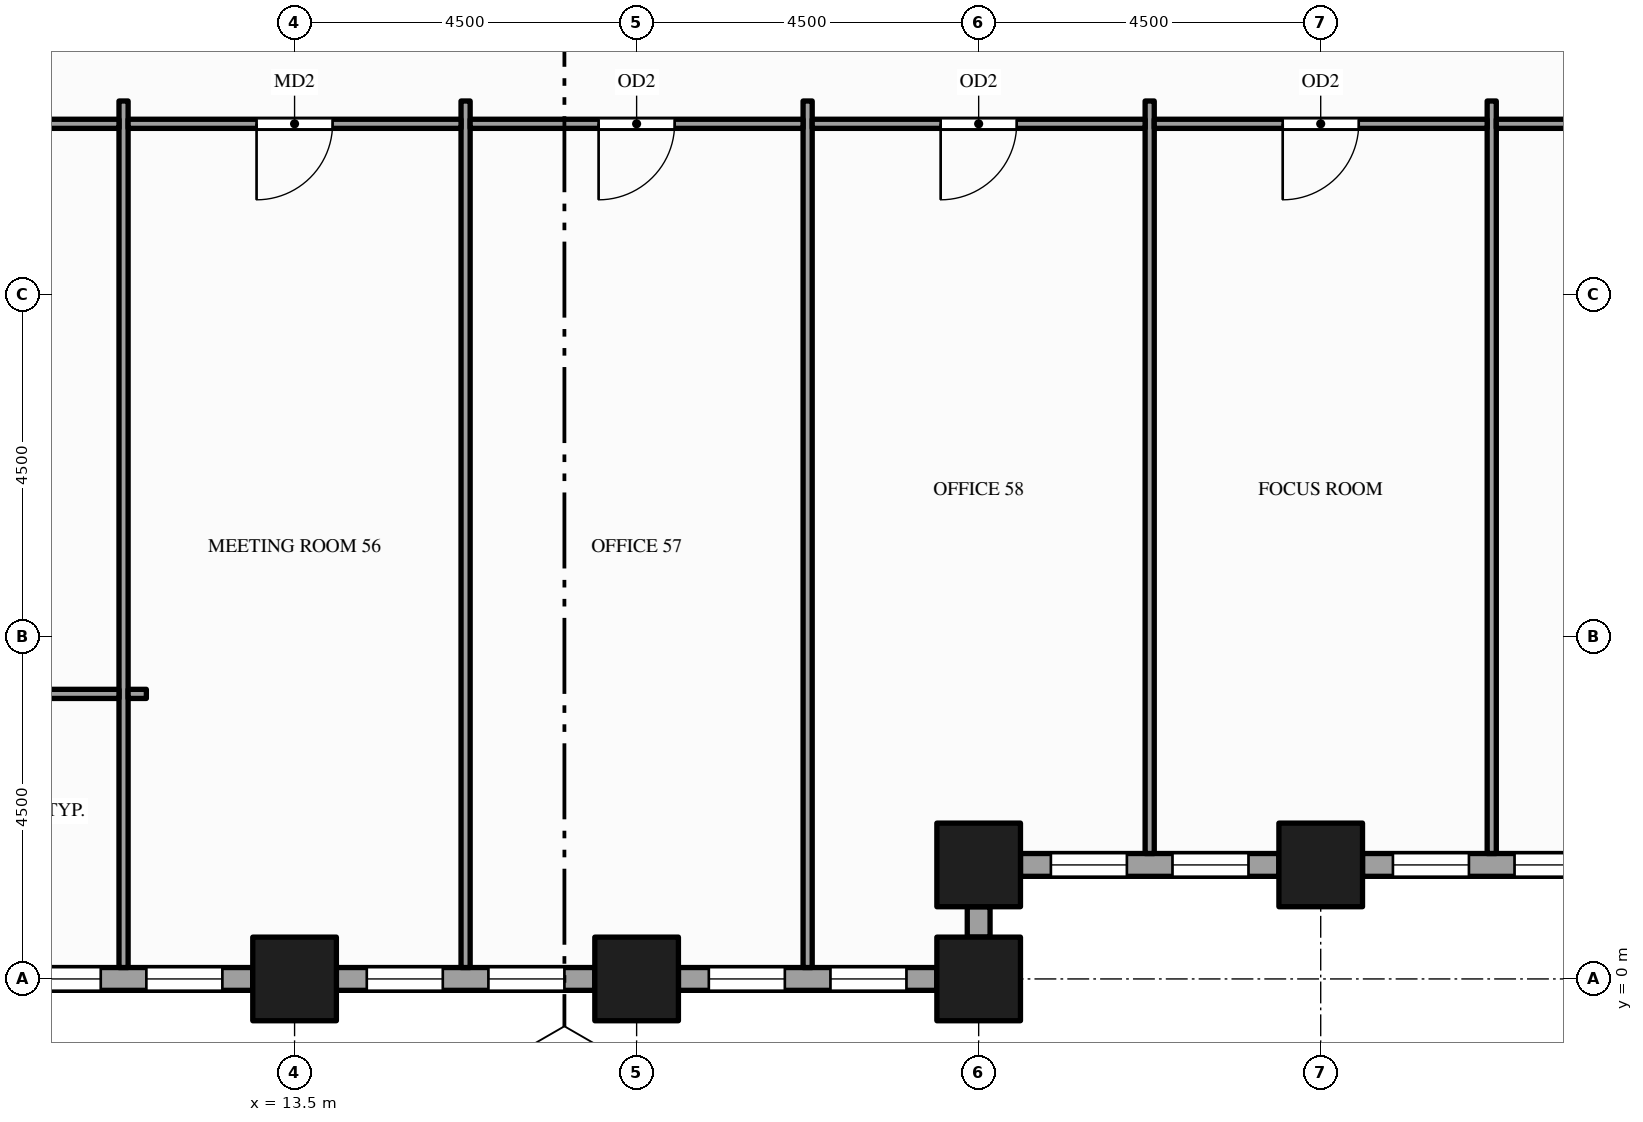
"""IFC4 building model, lengths in metres.
Left out: names, types, materials, properties, quantities, classifications, styles, units other than length and angle.
Written with IfcOpenShell. Run it as: python <this file> out.ifc"""

import sys

from ifc_helpers import new_model, si_unit, direction, frame, frame_2d, origin, origin_2d, place, context, subcontext, project, spatial, rectangle, hollow_rectangle, extrude, element, fill, save


model = new_model("IFC4")
c1 = context("Model", 3, precision=1e-05, world=origin(), true_north=direction((0.0, 1.0)))
c2 = subcontext(c1, "Body", "Model", "MODEL_VIEW")
j1 = project(units=[si_unit("LENGTHUNIT", "METRE"), si_unit("PLANEANGLEUNIT", "RADIAN")], contexts=[c1])
p1 = place(None, origin())
s1 = spatial("IfcSite", under=j1, at=p1, CompositionType="ELEMENT")
p2 = place(p1, origin())
s2 = spatial("IfcBuilding", under=s1, at=p2, CompositionType="ELEMENT")
p3 = place(p2, frame((0.0, 0.0, 45.0)))
s3 = spatial("IfcBuildingStorey", under=s2, at=p3, CompositionType="ELEMENT", Elevation=45.0)
for number, where, z_axis, x_axis in (
    (1, (13.5, 0.0, -0.15), (0.0, 0.0, 1.0), (1.0, 0.0, 0.0)),
    (2, (18.0, 0.0, -0.15), (0.0, 0.0, 1.0), (1.0, 0.0, 0.0)),
    (3, (22.5, 0.0, -0.15), (0.0, 0.0, 1.0), (1.0, 0.0, 0.0)),
    (4, (22.5, 1.5, -0.15), (0.0, 0.0, 1.0), (1.0, 0.0, 0.0)),
    (5, (27.0, 1.5, -0.15), (0.0, 0.0, 1.0), (1.0, 0.0, 0.0)),
):
    element("IfcColumn", number, at=place(p3, frame(where, z_axis=z_axis, x_axis=x_axis)), inside=s3, PredefinedType="COLUMN", context=c2, shape_type="SweptSolid", body=[
        extrude(hollow_rectangle(XDim=1.1, YDim=1.1, WallThickness=0.06, at=origin_2d()), origin(), (0.0, 0.0, 1.0), 4.0),
    ])
p4 = place(p3, frame((9.55, 0.0, 0.0), z_axis=(0.0, 0.0, 1.0), x_axis=(1.0, 0.0, 0.0)))
e6 = element("IfcWall", 6, at=p4, inside=s3, PredefinedType="STANDARD", context=c2, shape_type="SweptSolid", body=[
    extrude(rectangle(XDim=3.4, YDim=0.3, at=frame_2d((1.7, 0.0))), origin(), (0.0, 0.0, 1.0), 3.144),
])
p5 = place(p4, frame((0.4, 0.0, 0.9)))
e7 = element("IfcOpeningElement", 7, at=p5, cuts=e6, PredefinedType="OPENING", context=c2, shape_type="SweptSolid", body=[
    extrude(rectangle(XDim=1.0, YDim=2.0, at=frame_2d((0.5, 1.0))), frame((0.0, 0.16, 0.0), z_axis=(0.0, -1.0, 0.0), x_axis=(1.0, 0.0, 0.0)), (0.0, 0.0, 1.0), 0.32),
])
p6 = place(p4, frame((2.0, 0.0, 0.9)))
e8 = element("IfcOpeningElement", 8, at=p6, cuts=e6, PredefinedType="OPENING", context=c2, shape_type="SweptSolid", body=[
    extrude(rectangle(XDim=1.0, YDim=2.0, at=frame_2d((0.5, 1.0))), frame((0.0, 0.16, 0.0), z_axis=(0.0, -1.0, 0.0), x_axis=(1.0, 0.0, 0.0)), (0.0, 0.0, 1.0), 0.32),
])
p7 = place(p3, frame((14.05, 0.0, 0.0), z_axis=(0.0, 0.0, 1.0), x_axis=(1.0, 0.0, 0.0)))
e9 = element("IfcWall", 9, at=p7, inside=s3, PredefinedType="STANDARD", context=c2, shape_type="SweptSolid", body=[
    extrude(rectangle(XDim=3.4, YDim=0.3, at=frame_2d((1.7, 0.0))), origin(), (0.0, 0.0, 1.0), 3.144),
])
p8 = place(p7, frame((0.4, 0.0, 0.9)))
e10 = element("IfcOpeningElement", 10, at=p8, cuts=e9, PredefinedType="OPENING", context=c2, shape_type="SweptSolid", body=[
    extrude(rectangle(XDim=1.0, YDim=2.0, at=frame_2d((0.5, 1.0))), frame((0.0, 0.16, 0.0), z_axis=(0.0, -1.0, 0.0), x_axis=(1.0, 0.0, 0.0)), (0.0, 0.0, 1.0), 0.32),
])
p9 = place(p7, frame((2.0, 0.0, 0.9)))
e11 = element("IfcOpeningElement", 11, at=p9, cuts=e9, PredefinedType="OPENING", context=c2, shape_type="SweptSolid", body=[
    extrude(rectangle(XDim=1.0, YDim=2.0, at=frame_2d((0.5, 1.0))), frame((0.0, 0.16, 0.0), z_axis=(0.0, -1.0, 0.0), x_axis=(1.0, 0.0, 0.0)), (0.0, 0.0, 1.0), 0.32),
])
p10 = place(p3, frame((18.55, 0.0, 0.0), z_axis=(0.0, 0.0, 1.0), x_axis=(1.0, 0.0, 0.0)))
e12 = element("IfcWall", 12, at=p10, inside=s3, PredefinedType="STANDARD", context=c2, shape_type="SweptSolid", body=[
    extrude(rectangle(XDim=3.4, YDim=0.3, at=frame_2d((1.7, 0.0))), origin(), (0.0, 0.0, 1.0), 3.144),
])
p11 = place(p10, frame((0.4, 0.0, 0.9)))
e13 = element("IfcOpeningElement", 13, at=p11, cuts=e12, PredefinedType="OPENING", context=c2, shape_type="SweptSolid", body=[
    extrude(rectangle(XDim=1.0, YDim=2.0, at=frame_2d((0.5, 1.0))), frame((0.0, 0.16, 0.0), z_axis=(0.0, -1.0, 0.0), x_axis=(1.0, 0.0, 0.0)), (0.0, 0.0, 1.0), 0.32),
])
p12 = place(p10, frame((2.0, 0.0, 0.9)))
e14 = element("IfcOpeningElement", 14, at=p12, cuts=e12, PredefinedType="OPENING", context=c2, shape_type="SweptSolid", body=[
    extrude(rectangle(XDim=1.0, YDim=2.0, at=frame_2d((0.5, 1.0))), frame((0.0, 0.16, 0.0), z_axis=(0.0, -1.0, 0.0), x_axis=(1.0, 0.0, 0.0)), (0.0, 0.0, 1.0), 0.32),
])
p13 = place(p3, frame((22.5, 0.55, 0.0), z_axis=(0.0, 0.0, 1.0), x_axis=(0.0, 1.0, 0.0)))
e15 = element("IfcWall", 15, at=p13, inside=s3, PredefinedType="STANDARD", context=c2, shape_type="SweptSolid", body=[
    extrude(rectangle(XDim=0.4, YDim=0.3, at=frame_2d((0.2, 0.0))), origin(), (0.0, 0.0, 1.0), 3.144),
])
p14 = place(p3, frame((23.05, 1.5, 0.0), z_axis=(0.0, 0.0, 1.0), x_axis=(1.0, 0.0, 0.0)))
e16 = element("IfcWall", 16, at=p14, inside=s3, PredefinedType="STANDARD", context=c2, shape_type="SweptSolid", body=[
    extrude(rectangle(XDim=3.4, YDim=0.3, at=frame_2d((1.7, 0.0))), origin(), (0.0, 0.0, 1.0), 3.144),
])
p15 = place(p14, frame((0.4, 0.0, 0.9)))
e17 = element("IfcOpeningElement", 17, at=p15, cuts=e16, PredefinedType="OPENING", context=c2, shape_type="SweptSolid", body=[
    extrude(rectangle(XDim=1.0, YDim=2.0, at=frame_2d((0.5, 1.0))), frame((0.0, 0.16, 0.0), z_axis=(0.0, -1.0, 0.0), x_axis=(1.0, 0.0, 0.0)), (0.0, 0.0, 1.0), 0.32),
])
p16 = place(p14, frame((2.0, 0.0, 0.9)))
e18 = element("IfcOpeningElement", 18, at=p16, cuts=e16, PredefinedType="OPENING", context=c2, shape_type="SweptSolid", body=[
    extrude(rectangle(XDim=1.0, YDim=2.0, at=frame_2d((0.5, 1.0))), frame((0.0, 0.16, 0.0), z_axis=(0.0, -1.0, 0.0), x_axis=(1.0, 0.0, 0.0)), (0.0, 0.0, 1.0), 0.32),
])
p17 = place(p3, frame((27.55, 1.5, 0.0), z_axis=(0.0, 0.0, 1.0), x_axis=(1.0, 0.0, 0.0)))
e19 = element("IfcWall", 19, at=p17, inside=s3, PredefinedType="STANDARD", context=c2, shape_type="SweptSolid", body=[
    extrude(rectangle(XDim=3.4, YDim=0.3, at=frame_2d((1.7, 0.0))), origin(), (0.0, 0.0, 1.0), 3.144),
])
p18 = place(p17, frame((0.4, 0.0, 0.9)))
e20 = element("IfcOpeningElement", 20, at=p18, cuts=e19, PredefinedType="OPENING", context=c2, shape_type="SweptSolid", body=[
    extrude(rectangle(XDim=1.0, YDim=2.0, at=frame_2d((0.5, 1.0))), frame((0.0, 0.16, 0.0), z_axis=(0.0, -1.0, 0.0), x_axis=(1.0, 0.0, 0.0)), (0.0, 0.0, 1.0), 0.32),
])
p19 = place(p17, frame((2.0, 0.0, 0.9)))
e21 = element("IfcOpeningElement", 21, at=p19, cuts=e19, PredefinedType="OPENING", context=c2, shape_type="SweptSolid", body=[
    extrude(rectangle(XDim=1.0, YDim=2.0, at=frame_2d((0.5, 1.0))), frame((0.0, 0.16, 0.0), z_axis=(0.0, -1.0, 0.0), x_axis=(1.0, 0.0, 0.0)), (0.0, 0.0, 1.0), 0.32),
])
for number, where, z_axis, x_axis in (
    (22, (11.25, 0.15, 0.0), (0.0, 0.0, 1.0), (0.0, 1.0, 0.0)),
    (23, (15.75, 0.15, 0.0), (0.0, 0.0, 1.0), (0.0, 1.0, 0.0)),
    (24, (20.25, 0.15, 0.0), (0.0, 0.0, 1.0), (0.0, 1.0, 0.0)),
):
    element("IfcWall", number, at=place(p3, frame(where, z_axis=z_axis, x_axis=x_axis)), inside=s3, PredefinedType="PARTITIONING", context=c2, shape_type="SweptSolid", body=[
        extrude(rectangle(XDim=11.4, YDim=0.12, at=frame_2d((5.7, 0.0))), origin(), (0.0, 0.0, 1.0), 2.938),
    ])
for number, where, z_axis, x_axis in (
    (25, (24.75, 1.65, 0.0), (0.0, 0.0, 1.0), (0.0, 1.0, 0.0)),
    (26, (29.25, 1.65, 0.0), (0.0, 0.0, 1.0), (0.0, 1.0, 0.0)),
):
    element("IfcWall", number, at=place(p3, frame(where, z_axis=z_axis, x_axis=x_axis)), inside=s3, PredefinedType="PARTITIONING", context=c2, shape_type="SweptSolid", body=[
        extrude(rectangle(XDim=9.9, YDim=0.12, at=frame_2d((4.95, 0.0))), origin(), (0.0, 0.0, 1.0), 2.938),
    ])
p20 = place(p3, frame((9.125, 3.75, 0.0), z_axis=(0.0, 0.0, 1.0), x_axis=(1.0, 0.0, 0.0)))
e27 = element("IfcWall", 27, at=p20, inside=s3, PredefinedType="PARTITIONING", context=c2, shape_type="SweptSolid", body=[
    extrude(rectangle(XDim=2.065, YDim=0.12, at=frame_2d((1.032, 0.0))), origin(), (0.0, 0.0, 1.0), 2.938),
])
p21 = place(p3, frame((11.31, 3.75, 0.0), z_axis=(0.0, 0.0, 1.0), x_axis=(1.0, 0.0, 0.0)))
e28 = element("IfcWall", 28, at=p21, inside=s3, PredefinedType="PARTITIONING", context=c2, shape_type="SweptSolid", body=[
    extrude(rectangle(XDim=0.24, YDim=0.12, at=frame_2d((0.12, 0.0))), origin(), (0.0, 0.0, 1.0), 2.938),
])
p22 = place(p3, frame((0.15, 11.25, 0.0), z_axis=(0.0, 0.0, 1.0), x_axis=(1.0, 0.0, 0.0)))
e29 = element("IfcWall", 29, at=p22, inside=s3, PredefinedType="PARTITIONING", context=c2, shape_type="SweptSolid", body=[
    extrude(rectangle(XDim=11.04, YDim=0.12, at=frame_2d((5.52, 0.0))), origin(), (0.0, 0.0, 1.0), 2.938),
])
p23 = place(p22, frame((4.93, 0.0, 0.0)))
e30 = element("IfcOpeningElement", 30, at=p23, cuts=e29, PredefinedType="OPENING", context=c2, shape_type="SweptSolid", body=[
    extrude(rectangle(XDim=1.2, YDim=2.1, at=frame_2d((0.6, 1.05))), frame((0.0, 0.07, 0.0), z_axis=(0.0, -1.0, 0.0), x_axis=(1.0, 0.0, 0.0)), (0.0, 0.0, 1.0), 0.14),
])
p24 = place(p3, frame((11.31, 11.25, 0.0), z_axis=(0.0, 0.0, 1.0), x_axis=(1.0, 0.0, 0.0)))
e31 = element("IfcWall", 31, at=p24, inside=s3, PredefinedType="PARTITIONING", context=c2, shape_type="SweptSolid", body=[
    extrude(rectangle(XDim=4.38, YDim=0.12, at=frame_2d((2.19, 0.0))), origin(), (0.0, 0.0, 1.0), 2.938),
])
p25 = place(p24, frame((1.69, 0.0, 0.0)))
e32 = element("IfcOpeningElement", 32, at=p25, cuts=e31, PredefinedType="OPENING", context=c2, shape_type="SweptSolid", body=[
    extrude(rectangle(XDim=1.0, YDim=2.1, at=frame_2d((0.5, 1.05))), frame((0.0, 0.07, 0.0), z_axis=(0.0, -1.0, 0.0), x_axis=(1.0, 0.0, 0.0)), (0.0, 0.0, 1.0), 0.14),
])
p26 = place(p3, frame((15.81, 11.25, 0.0), z_axis=(0.0, 0.0, 1.0), x_axis=(1.0, 0.0, 0.0)))
e33 = element("IfcWall", 33, at=p26, inside=s3, PredefinedType="PARTITIONING", context=c2, shape_type="SweptSolid", body=[
    extrude(rectangle(XDim=4.38, YDim=0.12, at=frame_2d((2.19, 0.0))), origin(), (0.0, 0.0, 1.0), 2.938),
])
p27 = place(p26, frame((1.69, 0.0, 0.0)))
e34 = element("IfcOpeningElement", 34, at=p27, cuts=e33, PredefinedType="OPENING", context=c2, shape_type="SweptSolid", body=[
    extrude(rectangle(XDim=1.0, YDim=2.1, at=frame_2d((0.5, 1.05))), frame((0.0, 0.07, 0.0), z_axis=(0.0, -1.0, 0.0), x_axis=(1.0, 0.0, 0.0)), (0.0, 0.0, 1.0), 0.14),
])
p28 = place(p3, frame((20.31, 11.25, 0.0), z_axis=(0.0, 0.0, 1.0), x_axis=(1.0, 0.0, 0.0)))
e35 = element("IfcWall", 35, at=p28, inside=s3, PredefinedType="PARTITIONING", context=c2, shape_type="SweptSolid", body=[
    extrude(rectangle(XDim=4.38, YDim=0.12, at=frame_2d((2.19, 0.0))), origin(), (0.0, 0.0, 1.0), 2.938),
])
p29 = place(p28, frame((1.69, 0.0, 0.0)))
e36 = element("IfcOpeningElement", 36, at=p29, cuts=e35, PredefinedType="OPENING", context=c2, shape_type="SweptSolid", body=[
    extrude(rectangle(XDim=1.0, YDim=2.1, at=frame_2d((0.5, 1.05))), frame((0.0, 0.07, 0.0), z_axis=(0.0, -1.0, 0.0), x_axis=(1.0, 0.0, 0.0)), (0.0, 0.0, 1.0), 0.14),
])
p30 = place(p3, frame((24.81, 11.25, 0.0), z_axis=(0.0, 0.0, 1.0), x_axis=(1.0, 0.0, 0.0)))
e37 = element("IfcWall", 37, at=p30, inside=s3, PredefinedType="PARTITIONING", context=c2, shape_type="SweptSolid", body=[
    extrude(rectangle(XDim=4.38, YDim=0.12, at=frame_2d((2.19, 0.0))), origin(), (0.0, 0.0, 1.0), 2.938),
])
p31 = place(p30, frame((1.69, 0.0, 0.0)))
e38 = element("IfcOpeningElement", 38, at=p31, cuts=e37, PredefinedType="OPENING", context=c2, shape_type="SweptSolid", body=[
    extrude(rectangle(XDim=1.0, YDim=2.1, at=frame_2d((0.5, 1.05))), frame((0.0, 0.07, 0.0), z_axis=(0.0, -1.0, 0.0), x_axis=(1.0, 0.0, 0.0)), (0.0, 0.0, 1.0), 0.14),
])
p32 = place(p3, frame((29.31, 11.25, 0.0), z_axis=(0.0, 0.0, 1.0), x_axis=(1.0, 0.0, 0.0)))
e39 = element("IfcWall", 39, at=p32, inside=s3, PredefinedType="PARTITIONING", context=c2, shape_type="SweptSolid", body=[
    extrude(rectangle(XDim=8.88, YDim=0.12, at=frame_2d((4.44, 0.0))), origin(), (0.0, 0.0, 1.0), 2.938),
])
p33 = place(p32, frame((3.54, 0.0, 0.0)))
e40 = element("IfcOpeningElement", 40, at=p33, cuts=e39, PredefinedType="OPENING", context=c2, shape_type="SweptSolid", body=[
    extrude(rectangle(XDim=1.8, YDim=2.1, at=frame_2d((0.9, 1.05))), frame((0.0, 0.07, 0.0), z_axis=(0.0, -1.0, 0.0), x_axis=(1.0, 0.0, 0.0)), (0.0, 0.0, 1.0), 0.14),
])
p34 = place(p5, origin())
e41 = element("IfcWindow", 41, at=p34, inside=s3, PartitioningType="SINGLE_PANEL", PredefinedType="WINDOW", context=c2, shape_type="SweptSolid", body=[
    extrude(rectangle(XDim=1.0, YDim=2.0, at=frame_2d((0.5, 1.0))), frame((0.0, 0.03, 0.0), z_axis=(0.0, -1.0, 0.0), x_axis=(1.0, 0.0, 0.0)), (0.0, 0.0, 1.0), 0.06),
])
fill(e7, e41)
p35 = place(p6, origin())
e42 = element("IfcWindow", 42, at=p35, inside=s3, PartitioningType="SINGLE_PANEL", PredefinedType="WINDOW", context=c2, shape_type="SweptSolid", body=[
    extrude(rectangle(XDim=1.0, YDim=2.0, at=frame_2d((0.5, 1.0))), frame((0.0, 0.03, 0.0), z_axis=(0.0, -1.0, 0.0), x_axis=(1.0, 0.0, 0.0)), (0.0, 0.0, 1.0), 0.06),
])
fill(e8, e42)
p36 = place(p8, origin())
e43 = element("IfcWindow", 43, at=p36, inside=s3, PartitioningType="SINGLE_PANEL", PredefinedType="WINDOW", context=c2, shape_type="SweptSolid", body=[
    extrude(rectangle(XDim=1.0, YDim=2.0, at=frame_2d((0.5, 1.0))), frame((0.0, 0.03, 0.0), z_axis=(0.0, -1.0, 0.0), x_axis=(1.0, 0.0, 0.0)), (0.0, 0.0, 1.0), 0.06),
])
fill(e10, e43)
p37 = place(p9, origin())
e44 = element("IfcWindow", 44, at=p37, inside=s3, PartitioningType="SINGLE_PANEL", PredefinedType="WINDOW", context=c2, shape_type="SweptSolid", body=[
    extrude(rectangle(XDim=1.0, YDim=2.0, at=frame_2d((0.5, 1.0))), frame((0.0, 0.03, 0.0), z_axis=(0.0, -1.0, 0.0), x_axis=(1.0, 0.0, 0.0)), (0.0, 0.0, 1.0), 0.06),
])
fill(e11, e44)
p38 = place(p11, origin())
e45 = element("IfcWindow", 45, at=p38, inside=s3, PartitioningType="SINGLE_PANEL", PredefinedType="WINDOW", context=c2, shape_type="SweptSolid", body=[
    extrude(rectangle(XDim=1.0, YDim=2.0, at=frame_2d((0.5, 1.0))), frame((0.0, 0.03, 0.0), z_axis=(0.0, -1.0, 0.0), x_axis=(1.0, 0.0, 0.0)), (0.0, 0.0, 1.0), 0.06),
])
fill(e13, e45)
p39 = place(p12, origin())
e46 = element("IfcWindow", 46, at=p39, inside=s3, PartitioningType="SINGLE_PANEL", PredefinedType="WINDOW", context=c2, shape_type="SweptSolid", body=[
    extrude(rectangle(XDim=1.0, YDim=2.0, at=frame_2d((0.5, 1.0))), frame((0.0, 0.03, 0.0), z_axis=(0.0, -1.0, 0.0), x_axis=(1.0, 0.0, 0.0)), (0.0, 0.0, 1.0), 0.06),
])
fill(e14, e46)
p40 = place(p15, origin())
e47 = element("IfcWindow", 47, at=p40, inside=s3, PartitioningType="SINGLE_PANEL", PredefinedType="WINDOW", context=c2, shape_type="SweptSolid", body=[
    extrude(rectangle(XDim=1.0, YDim=2.0, at=frame_2d((0.5, 1.0))), frame((0.0, 0.03, 0.0), z_axis=(0.0, -1.0, 0.0), x_axis=(1.0, 0.0, 0.0)), (0.0, 0.0, 1.0), 0.06),
])
fill(e17, e47)
p41 = place(p16, origin())
e48 = element("IfcWindow", 48, at=p41, inside=s3, PartitioningType="SINGLE_PANEL", PredefinedType="WINDOW", context=c2, shape_type="SweptSolid", body=[
    extrude(rectangle(XDim=1.0, YDim=2.0, at=frame_2d((0.5, 1.0))), frame((0.0, 0.03, 0.0), z_axis=(0.0, -1.0, 0.0), x_axis=(1.0, 0.0, 0.0)), (0.0, 0.0, 1.0), 0.06),
])
fill(e18, e48)
p42 = place(p18, origin())
e49 = element("IfcWindow", 49, at=p42, inside=s3, PartitioningType="SINGLE_PANEL", PredefinedType="WINDOW", context=c2, shape_type="SweptSolid", body=[
    extrude(rectangle(XDim=1.0, YDim=2.0, at=frame_2d((0.5, 1.0))), frame((0.0, 0.03, 0.0), z_axis=(0.0, -1.0, 0.0), x_axis=(1.0, 0.0, 0.0)), (0.0, 0.0, 1.0), 0.06),
])
fill(e20, e49)
p43 = place(p19, origin())
e50 = element("IfcWindow", 50, at=p43, inside=s3, PartitioningType="SINGLE_PANEL", PredefinedType="WINDOW", context=c2, shape_type="SweptSolid", body=[
    extrude(rectangle(XDim=1.0, YDim=2.0, at=frame_2d((0.5, 1.0))), frame((0.0, 0.03, 0.0), z_axis=(0.0, -1.0, 0.0), x_axis=(1.0, 0.0, 0.0)), (0.0, 0.0, 1.0), 0.06),
])
fill(e21, e50)
p44 = place(p25, origin())
e51 = element("IfcDoor", 51, at=p44, inside=s3, OperationType="SINGLE_SWING_LEFT", PredefinedType="DOOR", context=c2, shape_type="SweptSolid", body=[
    extrude(rectangle(XDim=1.0, YDim=2.1, at=frame_2d((0.5, 1.05))), frame((0.0, 0.025, 0.0), z_axis=(0.0, -1.0, 0.0), x_axis=(1.0, 0.0, 0.0)), (0.0, 0.0, 1.0), 0.05),
])
fill(e32, e51)
p45 = place(p27, origin())
e52 = element("IfcDoor", 52, at=p45, inside=s3, OperationType="SINGLE_SWING_LEFT", PredefinedType="DOOR", context=c2, shape_type="SweptSolid", body=[
    extrude(rectangle(XDim=1.0, YDim=2.1, at=frame_2d((0.5, 1.05))), frame((0.0, 0.025, 0.0), z_axis=(0.0, -1.0, 0.0), x_axis=(1.0, 0.0, 0.0)), (0.0, 0.0, 1.0), 0.05),
])
fill(e34, e52)
p46 = place(p29, origin())
e53 = element("IfcDoor", 53, at=p46, inside=s3, OperationType="SINGLE_SWING_LEFT", PredefinedType="DOOR", context=c2, shape_type="SweptSolid", body=[
    extrude(rectangle(XDim=1.0, YDim=2.1, at=frame_2d((0.5, 1.05))), frame((0.0, 0.025, 0.0), z_axis=(0.0, -1.0, 0.0), x_axis=(1.0, 0.0, 0.0)), (0.0, 0.0, 1.0), 0.05),
])
fill(e36, e53)
p47 = place(p31, origin())
e54 = element("IfcDoor", 54, at=p47, inside=s3, OperationType="SINGLE_SWING_LEFT", PredefinedType="DOOR", context=c2, shape_type="SweptSolid", body=[
    extrude(rectangle(XDim=1.0, YDim=2.1, at=frame_2d((0.5, 1.05))), frame((0.0, 0.025, 0.0), z_axis=(0.0, -1.0, 0.0), x_axis=(1.0, 0.0, 0.0)), (0.0, 0.0, 1.0), 0.05),
])
fill(e38, e54)
save(model, sys.argv[1])
